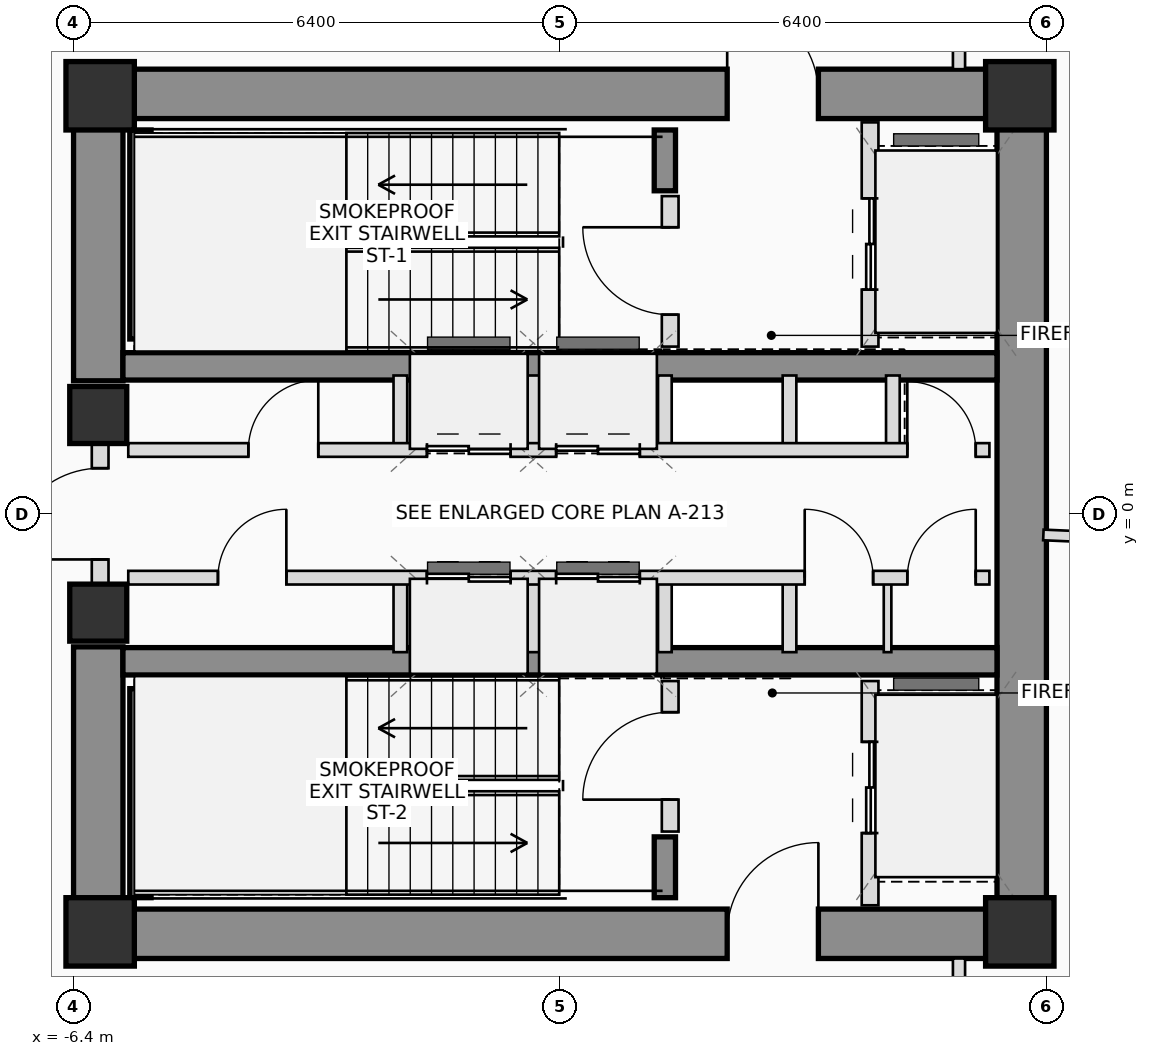
"""IFC4 building model, lengths in metres.
Left out: names, types, materials, properties, quantities, classifications, styles, units other than length and angle.
Written with IfcOpenShell. Run it as: python <this file> out.ifc"""

import sys

from ifc_helpers import new_model, si_unit, direction, frame, frame_2d, origin, origin_2d, place, context, subcontext, project, spatial, rectangle, extrude, source, transform, mapped, element, fill, save


model = new_model("IFC4")
c1 = context("Model", 3, precision=1e-05, world=origin(), true_north=direction((0.0, 1.0)))
c2 = subcontext(c1, "Body", "Model", "MODEL_VIEW")
j1 = project(units=[si_unit("LENGTHUNIT", "METRE"), si_unit("PLANEANGLEUNIT", "RADIAN")], contexts=[c1])
p1 = place(None, origin())
s1 = spatial("IfcSite", under=j1, at=p1, CompositionType="ELEMENT")
p2 = place(p1, origin())
s2 = spatial("IfcBuilding", under=s1, at=p2, CompositionType="ELEMENT")
p3 = place(p2, frame((0.0, 0.0, 132.95)))
s3 = spatial("IfcBuildingStorey", under=s2, at=p3, CompositionType="ELEMENT", Elevation=132.95)
m1 = source(origin(), c2, "Body", "SweptSolid", [
    extrude(rectangle(XDim=0.9, YDim=0.9, at=origin_2d()), origin(), (0.0, 0.0, 1.0), 3.45),
])
for number, where, z_axis, x_axis in (
    (1, (-6.05, -5.5, 0.0), (0.0, 0.0, 1.0), (1.0, 0.0, 0.0)),
    (2, (6.05, -5.5, 0.0), (0.0, 0.0, 1.0), (1.0, 0.0, 0.0)),
    (3, (6.05, 5.5, 0.0), (0.0, 0.0, 1.0), (1.0, 0.0, 0.0)),
    (4, (-6.05, 5.5, 0.0), (0.0, 0.0, 1.0), (1.0, 0.0, 0.0)),
):
    element("IfcColumn", number, at=place(p3, frame(where, z_axis=z_axis, x_axis=x_axis)), inside=s3, PredefinedType="COLUMN", context=c2, shape_type="MappedRepresentation", body=[
        mapped(m1, transform((0.0, 0.0, 0.0), scale=1.0)),
    ])
p4 = place(p3, frame((-6.4, 5.525, 0.0), z_axis=(0.0, 0.0, 1.0), x_axis=(1.0, 0.0, 0.0)))
e5 = element("IfcWall", 5, at=p4, inside=s3, PredefinedType="SHEAR", context=c2, shape_type="SweptSolid", body=[
    extrude(rectangle(XDim=12.8, YDim=0.65, at=frame_2d((6.4, 0.0))), origin(), (0.0, 0.0, 1.0), 3.45),
])
p5 = place(p4, frame((8.6, 0.0, 0.0)))
e6 = element("IfcOpeningElement", 6, at=p5, cuts=e5, PredefinedType="OPENING", context=c2, shape_type="SweptSolid", body=[
    extrude(rectangle(XDim=1.2, YDim=2.2, at=frame_2d((0.6, 1.1))), frame((0.0, 0.335, 0.0), z_axis=(0.0, -1.0, 0.0), x_axis=(1.0, 0.0, 0.0)), (0.0, 0.0, 1.0), 0.67),
])
p6 = place(p3, frame((-6.4, -5.525, 0.0), z_axis=(0.0, 0.0, 1.0), x_axis=(1.0, 0.0, 0.0)))
e7 = element("IfcWall", 7, at=p6, inside=s3, PredefinedType="SHEAR", context=c2, shape_type="SweptSolid", body=[
    extrude(rectangle(XDim=12.8, YDim=0.65, at=frame_2d((6.4, 0.0))), origin(), (0.0, 0.0, 1.0), 3.45),
])
p7 = place(p6, frame((8.6, 0.0, 0.0)))
e8 = element("IfcOpeningElement", 8, at=p7, cuts=e7, PredefinedType="OPENING", context=c2, shape_type="SweptSolid", body=[
    extrude(rectangle(XDim=1.2, YDim=2.2, at=frame_2d((0.6, 1.1))), frame((0.0, 0.335, 0.0), z_axis=(0.0, -1.0, 0.0), x_axis=(1.0, 0.0, 0.0)), (0.0, 0.0, 1.0), 0.67),
])
p8 = place(p3, frame((6.075, -5.2, 0.0), z_axis=(0.0, 0.0, 1.0), x_axis=(0.0, 1.0, 0.0)))
e9 = element("IfcWall", 9, at=p8, inside=s3, PredefinedType="SHEAR", context=c2, shape_type="SweptSolid", body=[
    extrude(rectangle(XDim=10.4, YDim=0.65, at=frame_2d((5.2, 0.0))), origin(), (0.0, 0.0, 1.0), 3.45),
])
for number, where, z_axis, x_axis in (
    (10, (-6.075, -5.2, 0.0), (0.0, 0.0, 1.0), (0.0, 1.0, 0.0)),
    (11, (-6.075, 1.75, 0.0), (0.0, 0.0, 1.0), (0.0, 1.0, 0.0)),
):
    element("IfcWall", number, at=place(p3, frame(where, z_axis=z_axis, x_axis=x_axis)), inside=s3, PredefinedType="SHEAR", context=c2, shape_type="SweptSolid", body=[
        extrude(rectangle(XDim=3.45, YDim=0.65, at=frame_2d((1.725, 0.0))), origin(), (0.0, 0.0, 1.0), 3.45),
    ])
for number, where, z_axis, x_axis in (
    (12, (-5.75, 1.94, 0.0), (0.0, 0.0, 1.0), (1.0, 0.0, 0.0)),
    (13, (-5.75, -1.94, 0.0), (0.0, 0.0, 1.0), (1.0, 0.0, 0.0)),
):
    element("IfcWall", number, at=place(p3, frame(where, z_axis=z_axis, x_axis=x_axis)), inside=s3, PredefinedType="SHEAR", context=c2, shape_type="SweptSolid", body=[
        extrude(rectangle(XDim=11.5, YDim=0.36, at=frame_2d((5.75, 0.0))), origin(), (0.0, 0.0, 1.0), 3.45),
    ])
p9 = place(p3, frame((-5.52, 2.3, 0.0), z_axis=(0.0, 0.0, 1.0), x_axis=(0.0, 1.0, 0.0)))
e14 = element("IfcWall", 14, at=p9, inside=s3, PredefinedType="SHEAR", context=c2, shape_type="SweptSolid", body=[
    extrude(rectangle(XDim=2.75, YDim=0.28, at=frame_2d((1.375, 0.0))), origin(), (0.0, 0.0, 1.0), 3.45),
])
p10 = place(p3, frame((1.38, 4.25, 0.0), z_axis=(0.0, 0.0, 1.0), x_axis=(0.0, 1.0, 0.0)))
e15 = element("IfcWall", 15, at=p10, inside=s3, PredefinedType="SHEAR", context=c2, shape_type="SweptSolid", body=[
    extrude(rectangle(XDim=0.8, YDim=0.28, at=frame_2d((0.4, 0.0))), origin(), (0.0, 0.0, 1.0), 3.45),
])
p11 = place(p3, frame((-5.52, -5.05, 0.0), z_axis=(0.0, 0.0, 1.0), x_axis=(0.0, 1.0, 0.0)))
e16 = element("IfcWall", 16, at=p11, inside=s3, PredefinedType="SHEAR", context=c2, shape_type="SweptSolid", body=[
    extrude(rectangle(XDim=2.75, YDim=0.28, at=frame_2d((1.375, 0.0))), origin(), (0.0, 0.0, 1.0), 3.45),
])
p12 = place(p3, frame((1.38, -5.05, 0.0), z_axis=(0.0, 0.0, 1.0), x_axis=(0.0, 1.0, 0.0)))
e17 = element("IfcWall", 17, at=p12, inside=s3, PredefinedType="SHEAR", context=c2, shape_type="SweptSolid", body=[
    extrude(rectangle(XDim=0.8, YDim=0.28, at=frame_2d((0.4, 0.0))), origin(), (0.0, 0.0, 1.0), 3.45),
])
m2 = source(origin(), c2, "Body", "SweptSolid", [
    extrude(rectangle(XDim=0.75, YDim=0.75, at=origin_2d()), origin(), (0.0, 0.0, 1.0), 3.45),
])
for number, where, z_axis, x_axis in (
    (18, (-6.075, -1.3, 0.0), (0.0, 0.0, 1.0), (1.0, 0.0, 0.0)),
    (19, (-6.075, 1.3, 0.0), (0.0, 0.0, 1.0), (1.0, 0.0, 0.0)),
):
    element("IfcColumn", number, at=place(p3, frame(where, z_axis=z_axis, x_axis=x_axis)), inside=s3, PredefinedType="COLUMN", context=c2, shape_type="MappedRepresentation", body=[
        mapped(m2, transform((0.0, 0.0, 0.0), scale=1.0)),
    ])
p13 = place(p3, frame((-6.05, -0.95, 0.0), z_axis=(0.0, 0.0, 1.0), x_axis=(0.0, 1.0, 0.0)))
e20 = element("IfcWall", 20, at=p13, inside=s3, PredefinedType="PLUMBINGWALL", context=c2, shape_type="SweptSolid", body=[
    extrude(rectangle(XDim=1.9, YDim=0.22, at=frame_2d((0.95, 0.0))), origin(), (0.0, 0.0, 1.0), 2.23),
])
p14 = place(p13, frame((0.35, 0.0, 0.0)))
e21 = element("IfcOpeningElement", 21, at=p14, cuts=e20, PredefinedType="OPENING", context=c2, shape_type="SweptSolid", body=[
    extrude(rectangle(XDim=1.2, YDim=2.2, at=frame_2d((0.6, 1.1))), frame((0.0, 0.12, 0.0), z_axis=(0.0, -1.0, 0.0), x_axis=(1.0, 0.0, 0.0)), (0.0, 0.0, 1.0), 0.24),
])
p15 = place(p3, frame((1.45, 2.2, 0.0), z_axis=(0.0, 0.0, 1.0), x_axis=(0.0, 1.0, 0.0)))
e22 = element("IfcWall", 22, at=p15, inside=s3, PredefinedType="PLUMBINGWALL", context=c2, shape_type="SweptSolid", body=[
    extrude(rectangle(XDim=1.98, YDim=0.22, at=frame_2d((0.99, 0.0))), origin(), (0.0, 0.0, 1.0), 3.25),
])
p16 = place(p15, frame((0.42, 0.0, 0.0)))
e23 = element("IfcOpeningElement", 23, at=p16, cuts=e22, PredefinedType="OPENING", context=c2, shape_type="SweptSolid", body=[
    extrude(rectangle(XDim=1.15, YDim=2.15, at=frame_2d((0.575, 1.075))), frame((0.0, 0.12, 0.0), z_axis=(0.0, -1.0, 0.0), x_axis=(1.0, 0.0, 0.0)), (0.0, 0.0, 1.0), 0.24),
])
p17 = place(p3, frame((4.08, 2.2, 0.0), z_axis=(0.0, 0.0, 1.0), x_axis=(0.0, 1.0, 0.0)))
e24 = element("IfcWall", 24, at=p17, inside=s3, PredefinedType="PLUMBINGWALL", context=c2, shape_type="SweptSolid", body=[
    extrude(rectangle(XDim=2.95, YDim=0.22, at=frame_2d((1.475, 0.0))), origin(), (0.0, 0.0, 1.0), 3.25),
])
p18 = place(p17, frame((0.75, 0.0, 0.0)))
e25 = element("IfcOpeningElement", 25, at=p18, cuts=e24, PredefinedType="OPENING", context=c2, shape_type="SweptSolid", body=[
    extrude(rectangle(XDim=1.2, YDim=2.25, at=frame_2d((0.6, 1.125))), frame((0.0, 0.12, 0.0), z_axis=(0.0, -1.0, 0.0), x_axis=(1.0, 0.0, 0.0)), (0.0, 0.0, 1.0), 0.24),
])
p19 = place(p3, frame((1.45, -4.18, 0.0), z_axis=(0.0, 0.0, 1.0), x_axis=(0.0, 1.0, 0.0)))
e26 = element("IfcWall", 26, at=p19, inside=s3, PredefinedType="PLUMBINGWALL", context=c2, shape_type="SweptSolid", body=[
    extrude(rectangle(XDim=1.98, YDim=0.22, at=frame_2d((0.99, 0.0))), origin(), (0.0, 0.0, 1.0), 3.25),
])
p20 = place(p19, frame((0.42, 0.0, 0.0)))
e27 = element("IfcOpeningElement", 27, at=p20, cuts=e26, PredefinedType="OPENING", context=c2, shape_type="SweptSolid", body=[
    extrude(rectangle(XDim=1.15, YDim=2.15, at=frame_2d((0.575, 1.075))), frame((0.0, 0.12, 0.0), z_axis=(0.0, -1.0, 0.0), x_axis=(1.0, 0.0, 0.0)), (0.0, 0.0, 1.0), 0.24),
])
p21 = place(p3, frame((4.08, -5.15, 0.0), z_axis=(0.0, 0.0, 1.0), x_axis=(0.0, 1.0, 0.0)))
e28 = element("IfcWall", 28, at=p21, inside=s3, PredefinedType="PLUMBINGWALL", context=c2, shape_type="SweptSolid", body=[
    extrude(rectangle(XDim=2.95, YDim=0.22, at=frame_2d((1.475, 0.0))), origin(), (0.0, 0.0, 1.0), 3.25),
])
p22 = place(p21, frame((0.95, 0.0, 0.0)))
e29 = element("IfcOpeningElement", 29, at=p22, cuts=e28, PredefinedType="OPENING", context=c2, shape_type="SweptSolid", body=[
    extrude(rectangle(XDim=1.2, YDim=2.25, at=frame_2d((0.6, 1.125))), frame((0.0, 0.12, 0.0), z_axis=(0.0, -1.0, 0.0), x_axis=(1.0, 0.0, 0.0)), (0.0, 0.0, 1.0), 0.24),
])
for number, where, z_axis, x_axis in (
    (30, (-2.1, 0.84, 0.0), (0.0, 0.0, 1.0), (0.0, 1.0, 0.0)),
    (31, (-2.1, -1.82, 0.0), (0.0, 0.0, 1.0), (0.0, 1.0, 0.0)),
    (32, (-0.35, 0.84, 0.0), (0.0, 0.0, 1.0), (0.0, 1.0, 0.0)),
    (33, (-0.35, -1.82, 0.0), (0.0, 0.0, 1.0), (0.0, 1.0, 0.0)),
    (34, (1.38, 0.84, 0.0), (0.0, 0.0, 1.0), (0.0, 1.0, 0.0)),
    (35, (1.38, -1.82, 0.0), (0.0, 0.0, 1.0), (0.0, 1.0, 0.0)),
    (36, (3.02, 0.84, 0.0), (0.0, 0.0, 1.0), (0.0, 1.0, 0.0)),
    (37, (4.38, 0.84, 0.0), (0.0, 0.0, 1.0), (0.0, 1.0, 0.0)),
    (38, (3.02, -1.82, 0.0), (0.0, 0.0, 1.0), (0.0, 1.0, 0.0)),
):
    element("IfcWall", number, at=place(p3, frame(where, z_axis=z_axis, x_axis=x_axis)), inside=s3, PredefinedType="PLUMBINGWALL", context=c2, shape_type="SweptSolid", body=[
        extrude(rectangle(XDim=0.98, YDim=0.18, at=frame_2d((0.49, 0.0))), origin(), (0.0, 0.0, 1.0), 3.25),
    ])
p23 = place(p3, frame((4.31, -1.82, 0.0), z_axis=(0.0, 0.0, 1.0), x_axis=(0.0, 1.0, 0.0)))
e39 = element("IfcWall", 39, at=p23, inside=s3, PredefinedType="PARTITIONING", context=c2, shape_type="SweptSolid", body=[
    extrude(rectangle(XDim=0.98, YDim=0.1, at=frame_2d((0.49, 0.0))), origin(), (0.0, 0.0, 1.0), 3.25),
])
p24 = place(p3, frame((-5.68, 0.84, 0.0), z_axis=(0.0, 0.0, 1.0), x_axis=(1.0, 0.0, 0.0)))
e40 = element("IfcWall", 40, at=p24, inside=s3, PredefinedType="PLUMBINGWALL", context=c2, shape_type="SweptSolid", body=[
    extrude(rectangle(XDim=11.33, YDim=0.18, at=frame_2d((5.665, 0.0))), origin(), (0.0, 0.0, 1.0), 3.25),
])
p25 = place(p24, frame((1.58, 0.0, 0.0)))
e41 = element("IfcOpeningElement", 41, at=p25, cuts=e40, PredefinedType="OPENING", context=c2, shape_type="SweptSolid", body=[
    extrude(rectangle(XDim=0.92, YDim=2.1, at=frame_2d((0.46, 1.05))), frame((0.0, 0.1, 0.0), z_axis=(0.0, -1.0, 0.0), x_axis=(1.0, 0.0, 0.0)), (0.0, 0.0, 1.0), 0.2),
])
p26 = place(p24, frame((3.93, 0.0, 0.0)))
e42 = element("IfcOpeningElement", 42, at=p26, cuts=e40, PredefinedType="OPENING", context=c2, shape_type="SweptSolid", body=[
    extrude(rectangle(XDim=1.1, YDim=2.2, at=frame_2d((0.55, 1.1))), frame((0.0, 0.1, 0.0), z_axis=(0.0, -1.0, 0.0), x_axis=(1.0, 0.0, 0.0)), (0.0, 0.0, 1.0), 0.2),
])
p27 = place(p24, frame((5.63, 0.0, 0.0)))
e43 = element("IfcOpeningElement", 43, at=p27, cuts=e40, PredefinedType="OPENING", context=c2, shape_type="SweptSolid", body=[
    extrude(rectangle(XDim=1.1, YDim=2.2, at=frame_2d((0.55, 1.1))), frame((0.0, 0.1, 0.0), z_axis=(0.0, -1.0, 0.0), x_axis=(1.0, 0.0, 0.0)), (0.0, 0.0, 1.0), 0.2),
])
p28 = place(p24, frame((10.25, 0.0, 0.0)))
e44 = element("IfcOpeningElement", 44, at=p28, cuts=e40, PredefinedType="OPENING", context=c2, shape_type="SweptSolid", body=[
    extrude(rectangle(XDim=0.9, YDim=2.05, at=frame_2d((0.45, 1.025))), frame((0.0, 0.1, 0.0), z_axis=(0.0, -1.0, 0.0), x_axis=(1.0, 0.0, 0.0)), (0.0, 0.0, 1.0), 0.2),
])
p29 = place(p3, frame((-5.68, -0.84, 0.0), z_axis=(0.0, 0.0, 1.0), x_axis=(1.0, 0.0, 0.0)))
e45 = element("IfcWall", 45, at=p29, inside=s3, PredefinedType="PLUMBINGWALL", context=c2, shape_type="SweptSolid", body=[
    extrude(rectangle(XDim=11.33, YDim=0.18, at=frame_2d((5.665, 0.0))), origin(), (0.0, 0.0, 1.0), 3.25),
])
p30 = place(p29, frame((1.18, 0.0, 0.0)))
e46 = element("IfcOpeningElement", 46, at=p30, cuts=e45, PredefinedType="OPENING", context=c2, shape_type="SweptSolid", body=[
    extrude(rectangle(XDim=0.9, YDim=2.05, at=frame_2d((0.45, 1.025))), frame((0.0, 0.1, 0.0), z_axis=(0.0, -1.0, 0.0), x_axis=(1.0, 0.0, 0.0)), (0.0, 0.0, 1.0), 0.2),
])
p31 = place(p29, frame((3.93, 0.0, 0.0)))
e47 = element("IfcOpeningElement", 47, at=p31, cuts=e45, PredefinedType="OPENING", context=c2, shape_type="SweptSolid", body=[
    extrude(rectangle(XDim=1.1, YDim=2.2, at=frame_2d((0.55, 1.1))), frame((0.0, 0.1, 0.0), z_axis=(0.0, -1.0, 0.0), x_axis=(1.0, 0.0, 0.0)), (0.0, 0.0, 1.0), 0.2),
])
p32 = place(p29, frame((5.63, 0.0, 0.0)))
e48 = element("IfcOpeningElement", 48, at=p32, cuts=e45, PredefinedType="OPENING", context=c2, shape_type="SweptSolid", body=[
    extrude(rectangle(XDim=1.1, YDim=2.2, at=frame_2d((0.55, 1.1))), frame((0.0, 0.1, 0.0), z_axis=(0.0, -1.0, 0.0), x_axis=(1.0, 0.0, 0.0)), (0.0, 0.0, 1.0), 0.2),
])
p33 = place(p29, frame((8.9, 0.0, 0.0)))
e49 = element("IfcOpeningElement", 49, at=p33, cuts=e45, PredefinedType="OPENING", context=c2, shape_type="SweptSolid", body=[
    extrude(rectangle(XDim=0.9, YDim=2.05, at=frame_2d((0.45, 1.025))), frame((0.0, 0.1, 0.0), z_axis=(0.0, -1.0, 0.0), x_axis=(1.0, 0.0, 0.0)), (0.0, 0.0, 1.0), 0.2),
])
p34 = place(p29, frame((10.25, 0.0, 0.0)))
e50 = element("IfcOpeningElement", 50, at=p34, cuts=e45, PredefinedType="OPENING", context=c2, shape_type="SweptSolid", body=[
    extrude(rectangle(XDim=0.9, YDim=2.05, at=frame_2d((0.45, 1.025))), frame((0.0, 0.1, 0.0), z_axis=(0.0, -1.0, 0.0), x_axis=(1.0, 0.0, 0.0)), (0.0, 0.0, 1.0), 0.2),
])
p35 = place(p3, frame((5.25, 7.55, 0.0), z_axis=(0.0, 0.0, 1.0), x_axis=(0.0, -1.0, 0.0)))
e51 = element("IfcWall", 51, at=p35, inside=s3, PredefinedType="PARTITIONING", context=c2, shape_type="SweptSolid", body=[
    extrude(rectangle(XDim=1.7, YDim=0.16, at=frame_2d((0.85, 0.0))), origin(), (0.0, 0.0, 1.0), 2.605),
])
p36 = place(p3, frame((5.25, -5.85, 0.0), z_axis=(0.0, 0.0, 1.0), x_axis=(0.0, -1.0, 0.0)))
e52 = element("IfcWall", 52, at=p36, inside=s3, PredefinedType="PARTITIONING", context=c2, shape_type="SweptSolid", body=[
    extrude(rectangle(XDim=1.7, YDim=0.16, at=frame_2d((0.85, 0.0))), origin(), (0.0, 0.0, 1.0), 3.25),
])
p37 = place(p3, frame((6.36, -0.278, 0.0), z_axis=(0.0, 0.0, 1.0), x_axis=(0.999047707238, -0.043631166178, 0.0)))
e53 = element("IfcWall", 53, at=p37, inside=s3, PredefinedType="PARTITIONING", context=c2, shape_type="SweptSolid", body=[
    extrude(rectangle(XDim=8.522, YDim=0.14, at=frame_2d((4.261, 0.0))), origin(), (0.0, 0.0, 1.0), 2.605),
])
p38 = place(p5, origin())
e54 = element("IfcDoor", 54, at=p38, inside=s3, OperationType="SINGLE_SWING_LEFT", PredefinedType="DOOR", context=c2, shape_type="SweptSolid", body=[
    extrude(rectangle(XDim=1.2, YDim=2.2, at=frame_2d((0.6, 1.1))), frame((0.0, 0.025, 0.0), z_axis=(0.0, -1.0, 0.0), x_axis=(1.0, 0.0, 0.0)), (0.0, 0.0, 1.0), 0.05),
])
fill(e6, e54)
p39 = place(p7, origin())
e55 = element("IfcDoor", 55, at=p39, inside=s3, OperationType="SINGLE_SWING_RIGHT", PredefinedType="DOOR", context=c2, shape_type="SweptSolid", body=[
    extrude(rectangle(XDim=1.2, YDim=2.2, at=frame_2d((0.6, 1.1))), frame((0.0, 0.025, 0.0), z_axis=(0.0, -1.0, 0.0), x_axis=(1.0, 0.0, 0.0)), (0.0, 0.0, 1.0), 0.05),
])
fill(e8, e55)
p40 = place(p14, origin())
e56 = element("IfcDoor", 56, at=p40, inside=s3, OperationType="SINGLE_SWING_LEFT", PredefinedType="DOOR", context=c2, shape_type="SweptSolid", body=[
    extrude(rectangle(XDim=1.2, YDim=2.2, at=frame_2d((0.6, 1.1))), frame((0.0, 0.025, 0.0), z_axis=(0.0, -1.0, 0.0), x_axis=(1.0, 0.0, 0.0)), (0.0, 0.0, 1.0), 0.05),
])
fill(e21, e56)
p41 = place(p16, origin())
e57 = element("IfcDoor", 57, at=p41, inside=s3, OperationType="SINGLE_SWING_RIGHT", PredefinedType="DOOR", context=c2, shape_type="SweptSolid", body=[
    extrude(rectangle(XDim=1.15, YDim=2.15, at=frame_2d((0.575, 1.075))), frame((0.0, 0.025, 0.0), z_axis=(0.0, -1.0, 0.0), x_axis=(1.0, 0.0, 0.0)), (0.0, 0.0, 1.0), 0.05),
])
fill(e23, e57)
p42 = place(p18, origin())
e58 = element("IfcDoor", 58, at=p42, inside=s3, OperationType="DOUBLE_DOOR_SLIDING", PredefinedType="DOOR", context=c2, shape_type="SweptSolid", body=[
    extrude(rectangle(XDim=1.2, YDim=2.25, at=frame_2d((0.6, 1.125))), frame((0.0, 0.025, 0.0), z_axis=(0.0, -1.0, 0.0), x_axis=(1.0, 0.0, 0.0)), (0.0, 0.0, 1.0), 0.05),
])
fill(e25, e58)
p43 = place(p20, origin())
e59 = element("IfcDoor", 59, at=p43, inside=s3, OperationType="SINGLE_SWING_LEFT", PredefinedType="DOOR", context=c2, shape_type="SweptSolid", body=[
    extrude(rectangle(XDim=1.15, YDim=2.15, at=frame_2d((0.575, 1.075))), frame((0.0, 0.025, 0.0), z_axis=(0.0, -1.0, 0.0), x_axis=(1.0, 0.0, 0.0)), (0.0, 0.0, 1.0), 0.05),
])
fill(e27, e59)
p44 = place(p22, origin())
e60 = element("IfcDoor", 60, at=p44, inside=s3, OperationType="DOUBLE_DOOR_SLIDING", PredefinedType="DOOR", context=c2, shape_type="SweptSolid", body=[
    extrude(rectangle(XDim=1.2, YDim=2.25, at=frame_2d((0.6, 1.125))), frame((0.0, 0.025, 0.0), z_axis=(0.0, -1.0, 0.0), x_axis=(1.0, 0.0, 0.0)), (0.0, 0.0, 1.0), 0.05),
])
fill(e29, e60)
p45 = place(p25, origin())
e61 = element("IfcDoor", 61, at=p45, inside=s3, OperationType="SINGLE_SWING_RIGHT", PredefinedType="DOOR", context=c2, shape_type="SweptSolid", body=[
    extrude(rectangle(XDim=0.92, YDim=2.1, at=frame_2d((0.46, 1.05))), frame((0.0, 0.025, 0.0), z_axis=(0.0, -1.0, 0.0), x_axis=(1.0, 0.0, 0.0)), (0.0, 0.0, 1.0), 0.05),
])
fill(e41, e61)
p46 = place(p26, origin())
e62 = element("IfcDoor", 62, at=p46, inside=s3, OperationType="DOUBLE_DOOR_SLIDING", PredefinedType="DOOR", context=c2, shape_type="SweptSolid", body=[
    extrude(rectangle(XDim=1.1, YDim=2.2, at=frame_2d((0.55, 1.1))), frame((0.0, 0.025, 0.0), z_axis=(0.0, -1.0, 0.0), x_axis=(1.0, 0.0, 0.0)), (0.0, 0.0, 1.0), 0.05),
])
fill(e42, e62)
p47 = place(p27, origin())
e63 = element("IfcDoor", 63, at=p47, inside=s3, OperationType="DOUBLE_DOOR_SLIDING", PredefinedType="DOOR", context=c2, shape_type="SweptSolid", body=[
    extrude(rectangle(XDim=1.1, YDim=2.2, at=frame_2d((0.55, 1.1))), frame((0.0, 0.025, 0.0), z_axis=(0.0, -1.0, 0.0), x_axis=(1.0, 0.0, 0.0)), (0.0, 0.0, 1.0), 0.05),
])
fill(e43, e63)
p48 = place(p28, origin())
e64 = element("IfcDoor", 64, at=p48, inside=s3, OperationType="SINGLE_SWING_LEFT", PredefinedType="DOOR", context=c2, shape_type="SweptSolid", body=[
    extrude(rectangle(XDim=0.9, YDim=2.05, at=frame_2d((0.45, 1.025))), frame((0.0, 0.025, 0.0), z_axis=(0.0, -1.0, 0.0), x_axis=(1.0, 0.0, 0.0)), (0.0, 0.0, 1.0), 0.05),
])
fill(e44, e64)
p49 = place(p30, origin())
e65 = element("IfcDoor", 65, at=p49, inside=s3, OperationType="SINGLE_SWING_RIGHT", PredefinedType="DOOR", context=c2, shape_type="SweptSolid", body=[
    extrude(rectangle(XDim=0.9, YDim=2.05, at=frame_2d((0.45, 1.025))), frame((0.0, 0.025, 0.0), z_axis=(0.0, -1.0, 0.0), x_axis=(1.0, 0.0, 0.0)), (0.0, 0.0, 1.0), 0.05),
])
fill(e46, e65)
p50 = place(p31, origin())
e66 = element("IfcDoor", 66, at=p50, inside=s3, OperationType="DOUBLE_DOOR_SLIDING", PredefinedType="DOOR", context=c2, shape_type="SweptSolid", body=[
    extrude(rectangle(XDim=1.1, YDim=2.2, at=frame_2d((0.55, 1.1))), frame((0.0, 0.025, 0.0), z_axis=(0.0, -1.0, 0.0), x_axis=(1.0, 0.0, 0.0)), (0.0, 0.0, 1.0), 0.05),
])
fill(e47, e66)
p51 = place(p32, origin())
e67 = element("IfcDoor", 67, at=p51, inside=s3, OperationType="DOUBLE_DOOR_SLIDING", PredefinedType="DOOR", context=c2, shape_type="SweptSolid", body=[
    extrude(rectangle(XDim=1.1, YDim=2.2, at=frame_2d((0.55, 1.1))), frame((0.0, 0.025, 0.0), z_axis=(0.0, -1.0, 0.0), x_axis=(1.0, 0.0, 0.0)), (0.0, 0.0, 1.0), 0.05),
])
fill(e48, e67)
p52 = place(p33, origin())
e68 = element("IfcDoor", 68, at=p52, inside=s3, OperationType="SINGLE_SWING_LEFT", PredefinedType="DOOR", context=c2, shape_type="SweptSolid", body=[
    extrude(rectangle(XDim=0.9, YDim=2.05, at=frame_2d((0.45, 1.025))), frame((0.0, 0.025, 0.0), z_axis=(0.0, -1.0, 0.0), x_axis=(1.0, 0.0, 0.0)), (0.0, 0.0, 1.0), 0.05),
])
fill(e49, e68)
p53 = place(p34, origin())
e69 = element("IfcDoor", 69, at=p53, inside=s3, OperationType="SINGLE_SWING_RIGHT", PredefinedType="DOOR", context=c2, shape_type="SweptSolid", body=[
    extrude(rectangle(XDim=0.9, YDim=2.05, at=frame_2d((0.45, 1.025))), frame((0.0, 0.025, 0.0), z_axis=(0.0, -1.0, 0.0), x_axis=(1.0, 0.0, 0.0)), (0.0, 0.0, 1.0), 0.05),
])
fill(e50, e69)
save(model, sys.argv[1])
